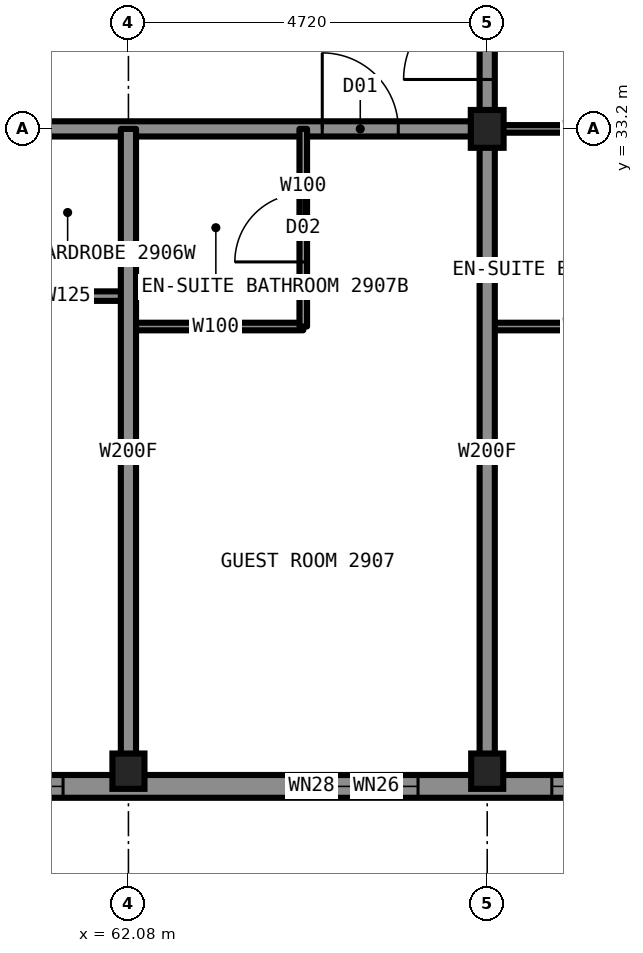
"""IFC4 building model, lengths in metres.
Left out: names, types, materials, properties, quantities, classifications, styles, units other than length and angle.
Written with IfcOpenShell. Run it as: python <this file> out.ifc"""

import sys

from ifc_helpers import new_model, si_unit, direction, frame, frame_2d, origin, origin_2d, place, context, subcontext, project, spatial, rectangle, i_section, extrude, element, fill, save


model = new_model("IFC4")
c1 = context("Model", 3, precision=1e-05, world=origin(), true_north=direction((0.0, 1.0)))
c2 = subcontext(c1, "Body", "Model", "MODEL_VIEW")
j1 = project(units=[si_unit("LENGTHUNIT", "METRE"), si_unit("PLANEANGLEUNIT", "RADIAN")], contexts=[c1])
p1 = place(None, origin())
s1 = spatial("IfcSite", under=j1, at=p1, CompositionType="ELEMENT")
p2 = place(p1, origin())
s2 = spatial("IfcBuilding", under=s1, at=p2, CompositionType="ELEMENT")
p3 = place(p2, frame((0.0, 0.0, 103.9)))
s3 = spatial("IfcBuildingStorey", under=s2, at=p3, CompositionType="ELEMENT", Elevation=103.9)
for number, where, z_axis, x_axis in (
    (1, (62.08, 24.75, 0.0), (0.0, 0.0, 1.0), (1.0, 0.0, 0.0)),
    (2, (66.8, 24.75, 0.0), (0.0, 0.0, 1.0), (1.0, 0.0, 0.0)),
):
    element("IfcColumn", number, at=place(p3, frame(where, z_axis=z_axis, x_axis=x_axis)), inside=s3, PredefinedType="COLUMN", context=c2, shape_type="SweptSolid", body=[
        extrude(i_section(OverallWidth=0.422, OverallDepth=0.465, WebThickness=0.045, FlangeThickness=0.073, at=origin_2d()), origin(), (0.0, 0.0, 1.0), 3.5),
    ])
p4 = place(p3, frame((66.8, 33.2, 0.0), z_axis=(0.0, 0.0, 1.0), x_axis=(1.0, 0.0, 0.0)))
e3 = element("IfcColumn", 3, at=p4, inside=s3, PredefinedType="COLUMN", context=c2, shape_type="SweptSolid", body=[
    extrude(i_section(OverallWidth=0.432, OverallDepth=0.498, WebThickness=0.056, FlangeThickness=0.089, at=origin_2d()), origin(), (0.0, 0.0, 1.0), 3.5),
])
p5 = place(p3, frame((66.8, 33.2, 0.0), z_axis=(0.0, 0.0, 1.0), x_axis=(1.0, 0.0, 0.0)))
e4 = element("IfcWall", 4, at=p5, inside=s3, PredefinedType="PARTITIONING", context=c2, shape_type="SweptSolid", body=[
    extrude(rectangle(XDim=2.6, YDim=0.1, at=frame_2d((1.3, 0.0))), origin(), (0.0, 0.0, 1.0), 2.573),
])
p6 = place(p3, frame((43.2, 33.2, 0.0), z_axis=(0.0, 0.0, 1.0), x_axis=(1.0, 0.0, 0.0)))
e5 = element("IfcWall", 5, at=p6, inside=s3, PredefinedType="PARTITIONING", context=c2, shape_type="SweptSolid", body=[
    extrude(rectangle(XDim=23.6, YDim=0.2, at=frame_2d((11.8, 0.0))), origin(), (0.0, 0.0, 1.0), 3.33),
])
p7 = place(p6, frame((3.0, 0.0, 0.0)))
e6 = element("IfcOpeningElement", 6, at=p7, cuts=e5, PredefinedType="OPENING", context=c2, shape_type="SweptSolid", body=[
    extrude(rectangle(XDim=1.0, YDim=2.2, at=frame_2d((0.5, 1.1))), frame((0.0, 0.11, 0.0), z_axis=(0.0, -1.0, 0.0), x_axis=(1.0, 0.0, 0.0)), (0.0, 0.0, 1.0), 0.22),
])
p8 = place(p6, frame((12.44, 0.0, 0.0)))
e7 = element("IfcOpeningElement", 7, at=p8, cuts=e5, PredefinedType="OPENING", context=c2, shape_type="SweptSolid", body=[
    extrude(rectangle(XDim=1.0, YDim=2.2, at=frame_2d((0.5, 1.1))), frame((0.0, 0.11, 0.0), z_axis=(0.0, -1.0, 0.0), x_axis=(1.0, 0.0, 0.0)), (0.0, 0.0, 1.0), 0.22),
])
p9 = place(p6, frame((21.43, 0.0, 0.0)))
e8 = element("IfcOpeningElement", 8, at=p9, cuts=e5, PredefinedType="OPENING", context=c2, shape_type="SweptSolid", body=[
    extrude(rectangle(XDim=1.0, YDim=2.2, at=frame_2d((0.5, 1.1))), frame((0.0, 0.11, 0.0), z_axis=(0.0, -1.0, 0.0), x_axis=(1.0, 0.0, 0.0)), (0.0, 0.0, 1.0), 0.22),
])
p10 = place(p3, frame((60.48, 31.0, 0.0), z_axis=(0.0, 0.0, 1.0), x_axis=(1.0, 0.0, 0.0)))
e9 = element("IfcWall", 9, at=p10, inside=s3, PredefinedType="PARTITIONING", context=c2, shape_type="SweptSolid", body=[
    extrude(rectangle(XDim=1.6, YDim=0.125, at=frame_2d((0.8, 0.0))), origin(), (0.0, 0.0, 1.0), 3.33),
])
p11 = place(p3, frame((62.08, 30.6, 0.0), z_axis=(0.0, 0.0, 1.0), x_axis=(1.0, 0.0, 0.0)))
e10 = element("IfcWall", 10, at=p11, inside=s3, PredefinedType="PARTITIONING", context=c2, shape_type="SweptSolid", body=[
    extrude(rectangle(XDim=2.3, YDim=0.1, at=frame_2d((1.15, 0.0))), origin(), (0.0, 0.0, 1.0), 3.33),
])
p12 = place(p3, frame((66.8, 30.6, 0.0), z_axis=(0.0, 0.0, 1.0), x_axis=(1.0, 0.0, 0.0)))
e11 = element("IfcWall", 11, at=p12, inside=s3, PredefinedType="PARTITIONING", context=c2, shape_type="SweptSolid", body=[
    extrude(rectangle(XDim=2.6, YDim=0.1, at=frame_2d((1.3, 0.0))), origin(), (0.0, 0.0, 1.0), 3.33),
])
p13 = place(p3, frame((66.8, 33.2, 0.0), z_axis=(0.0, 0.0, 1.0), x_axis=(0.0, 1.0, 0.0)))
e12 = element("IfcWall", 12, at=p13, inside=s3, PredefinedType="PARTITIONING", context=c2, shape_type="SweptSolid", body=[
    extrude(rectangle(XDim=23.58, YDim=0.2, at=frame_2d((11.79, 0.0))), origin(), (0.0, 0.0, 1.0), 3.33),
])
p14 = place(p13, frame((6.98, 0.0, 0.0)))
e13 = element("IfcOpeningElement", 13, at=p14, cuts=e12, PredefinedType="OPENING", context=c2, shape_type="SweptSolid", body=[
    extrude(rectangle(XDim=1.0, YDim=2.2, at=frame_2d((0.5, 1.1))), frame((0.0, 0.11, 0.0), z_axis=(0.0, -1.0, 0.0), x_axis=(1.0, 0.0, 0.0)), (0.0, 0.0, 1.0), 0.22),
])
p15 = place(p13, frame((12.59, 0.0, 0.0)))
e14 = element("IfcOpeningElement", 14, at=p15, cuts=e12, PredefinedType="OPENING", context=c2, shape_type="SweptSolid", body=[
    extrude(rectangle(XDim=1.0, YDim=2.2, at=frame_2d((0.5, 1.1))), frame((0.0, 0.11, 0.0), z_axis=(0.0, -1.0, 0.0), x_axis=(1.0, 0.0, 0.0)), (0.0, 0.0, 1.0), 0.22),
])
p16 = place(p13, frame((16.42, 0.0, 0.0)))
e15 = element("IfcOpeningElement", 15, at=p16, cuts=e12, PredefinedType="OPENING", context=c2, shape_type="SweptSolid", body=[
    extrude(rectangle(XDim=1.0, YDim=2.2, at=frame_2d((0.5, 1.1))), frame((0.0, 0.11, 0.0), z_axis=(0.0, -1.0, 0.0), x_axis=(1.0, 0.0, 0.0)), (0.0, 0.0, 1.0), 0.22),
])
p17 = place(p13, frame((21.85, 0.0, 0.0)))
e16 = element("IfcOpeningElement", 16, at=p17, cuts=e12, PredefinedType="OPENING", context=c2, shape_type="SweptSolid", body=[
    extrude(rectangle(XDim=1.1, YDim=2.2, at=frame_2d((0.55, 1.1))), frame((0.0, 0.11, 0.0), z_axis=(0.0, -1.0, 0.0), x_axis=(1.0, 0.0, 0.0)), (0.0, 0.0, 1.0), 0.22),
])
p18 = place(p13, frame((0.65, 0.0, 0.0)))
e17 = element("IfcOpeningElement", 17, at=p18, cuts=e12, PredefinedType="OPENING", context=c2, shape_type="SweptSolid", body=[
    extrude(rectangle(XDim=1.1, YDim=2.2, at=frame_2d((0.55, 1.1))), frame((0.0, 0.11, 0.0), z_axis=(0.0, -1.0, 0.0), x_axis=(1.0, 0.0, 0.0)), (0.0, 0.0, 1.0), 0.22),
])
for number, where, z_axis, x_axis in (
    (18, (66.8, 24.7, 0.0), (0.0, 0.0, 1.0), (0.0, 1.0, 0.0)),
    (19, (62.08, 24.7, 0.0), (0.0, 0.0, 1.0), (0.0, 1.0, 0.0)),
):
    element("IfcWall", number, at=place(p3, frame(where, z_axis=z_axis, x_axis=x_axis)), inside=s3, PredefinedType="PARTITIONING", context=c2, shape_type="SweptSolid", body=[
        extrude(rectangle(XDim=8.5, YDim=0.2, at=frame_2d((4.25, 0.0))), origin(), (0.0, 0.0, 1.0), 2.573),
    ])
p19 = place(p3, frame((64.38, 30.6, 0.0), z_axis=(0.0, 0.0, 1.0), x_axis=(0.0, 1.0, 0.0)))
e20 = element("IfcWall", 20, at=p19, inside=s3, PredefinedType="PARTITIONING", context=c2, shape_type="SweptSolid", body=[
    extrude(rectangle(XDim=2.6, YDim=0.1, at=frame_2d((1.3, 0.0))), origin(), (0.0, 0.0, 1.0), 3.33),
])
p20 = place(p19, frame((0.85, 0.0, 0.0)))
e21 = element("IfcOpeningElement", 21, at=p20, cuts=e20, PredefinedType="OPENING", context=c2, shape_type="SweptSolid", body=[
    extrude(rectangle(XDim=0.9, YDim=2.1, at=frame_2d((0.45, 1.05))), frame((0.0, 0.06, 0.0), z_axis=(0.0, -1.0, 0.0), x_axis=(1.0, 0.0, 0.0)), (0.0, 0.0, 1.0), 0.12),
])
p21 = place(p3, frame((39.9, 24.55, 0.0), z_axis=(0.0, 0.0, 1.0), x_axis=(1.0, 0.0, 0.0)))
e22 = element("IfcWall", 22, at=p21, inside=s3, PredefinedType="SOLIDWALL", context=c2, shape_type="SweptSolid", body=[
    extrude(rectangle(XDim=30.2, YDim=0.3, at=frame_2d((15.1, 0.0))), origin(), (0.0, 0.0, 1.0), 2.83),
])
p22 = place(p21, frame((4.16, 0.0, 0.5)))
e23 = element("IfcOpeningElement", 23, at=p22, cuts=e22, PredefinedType="OPENING", context=c2, shape_type="SweptSolid", body=[
    extrude(rectangle(XDim=3.0, YDim=2.0, at=frame_2d((1.5, 1.0))), frame((0.0, 0.16, 0.0), z_axis=(0.0, -1.0, 0.0), x_axis=(1.0, 0.0, 0.0)), (0.0, 0.0, 1.0), 0.32),
])
p23 = place(p21, frame((8.88, 0.0, 0.5)))
e24 = element("IfcOpeningElement", 24, at=p23, cuts=e22, PredefinedType="OPENING", context=c2, shape_type="SweptSolid", body=[
    extrude(rectangle(XDim=3.0, YDim=2.0, at=frame_2d((1.5, 1.0))), frame((0.0, 0.16, 0.0), z_axis=(0.0, -1.0, 0.0), x_axis=(1.0, 0.0, 0.0)), (0.0, 0.0, 1.0), 0.32),
])
p24 = place(p21, frame((13.6, 0.0, 0.5)))
e25 = element("IfcOpeningElement", 25, at=p24, cuts=e22, PredefinedType="OPENING", context=c2, shape_type="SweptSolid", body=[
    extrude(rectangle(XDim=3.0, YDim=2.0, at=frame_2d((1.5, 1.0))), frame((0.0, 0.16, 0.0), z_axis=(0.0, -1.0, 0.0), x_axis=(1.0, 0.0, 0.0)), (0.0, 0.0, 1.0), 0.32),
])
p25 = place(p21, frame((18.32, 0.0, 0.5)))
e26 = element("IfcOpeningElement", 26, at=p25, cuts=e22, PredefinedType="OPENING", context=c2, shape_type="SweptSolid", body=[
    extrude(rectangle(XDim=3.0, YDim=2.0, at=frame_2d((1.5, 1.0))), frame((0.0, 0.16, 0.0), z_axis=(0.0, -1.0, 0.0), x_axis=(1.0, 0.0, 0.0)), (0.0, 0.0, 1.0), 0.32),
])
p26 = place(p21, frame((23.04, 0.0, 0.5)))
e27 = element("IfcOpeningElement", 27, at=p26, cuts=e22, PredefinedType="OPENING", context=c2, shape_type="SweptSolid", body=[
    extrude(rectangle(XDim=3.0, YDim=2.0, at=frame_2d((1.5, 1.0))), frame((0.0, 0.16, 0.0), z_axis=(0.0, -1.0, 0.0), x_axis=(1.0, 0.0, 0.0)), (0.0, 0.0, 1.0), 0.32),
])
p27 = place(p9, origin())
e28 = element("IfcDoor", 28, at=p27, inside=s3, OperationType="SINGLE_SWING_LEFT", PredefinedType="DOOR", context=c2, shape_type="SweptSolid", body=[
    extrude(rectangle(XDim=1.0, YDim=2.2, at=frame_2d((0.5, 1.1))), frame((0.0, 0.025, 0.0), z_axis=(0.0, -1.0, 0.0), x_axis=(1.0, 0.0, 0.0)), (0.0, 0.0, 1.0), 0.05),
])
fill(e8, e28)
p28 = place(p20, origin())
e29 = element("IfcDoor", 29, at=p28, inside=s3, OperationType="SINGLE_SWING_RIGHT", PredefinedType="DOOR", context=c2, shape_type="SweptSolid", body=[
    extrude(rectangle(XDim=0.9, YDim=2.1, at=frame_2d((0.45, 1.05))), frame((0.0, 0.025, 0.0), z_axis=(0.0, -1.0, 0.0), x_axis=(1.0, 0.0, 0.0)), (0.0, 0.0, 1.0), 0.05),
])
fill(e21, e29)
p29 = place(p18, origin())
e30 = element("IfcDoor", 30, at=p29, inside=s3, OperationType="SINGLE_SWING_LEFT", PredefinedType="DOOR", context=c2, shape_type="SweptSolid", body=[
    extrude(rectangle(XDim=1.1, YDim=2.2, at=frame_2d((0.55, 1.1))), frame((0.0, 0.025, 0.0), z_axis=(0.0, -1.0, 0.0), x_axis=(1.0, 0.0, 0.0)), (0.0, 0.0, 1.0), 0.05),
])
fill(e17, e30)
p30 = place(p25, origin())
e31 = element("IfcWindow", 31, at=p30, inside=s3, PartitioningType="SINGLE_PANEL", PredefinedType="WINDOW", context=c2, shape_type="SweptSolid", body=[
    extrude(rectangle(XDim=3.0, YDim=2.0, at=frame_2d((1.5, 1.0))), frame((0.0, 0.03, 0.0), z_axis=(0.0, -1.0, 0.0), x_axis=(1.0, 0.0, 0.0)), (0.0, 0.0, 1.0), 0.06),
])
fill(e26, e31)
p31 = place(p26, origin())
e32 = element("IfcWindow", 32, at=p31, inside=s3, PartitioningType="SINGLE_PANEL", PredefinedType="WINDOW", context=c2, shape_type="SweptSolid", body=[
    extrude(rectangle(XDim=3.0, YDim=2.0, at=frame_2d((1.5, 1.0))), frame((0.0, 0.03, 0.0), z_axis=(0.0, -1.0, 0.0), x_axis=(1.0, 0.0, 0.0)), (0.0, 0.0, 1.0), 0.06),
])
fill(e27, e32)
save(model, sys.argv[1])
